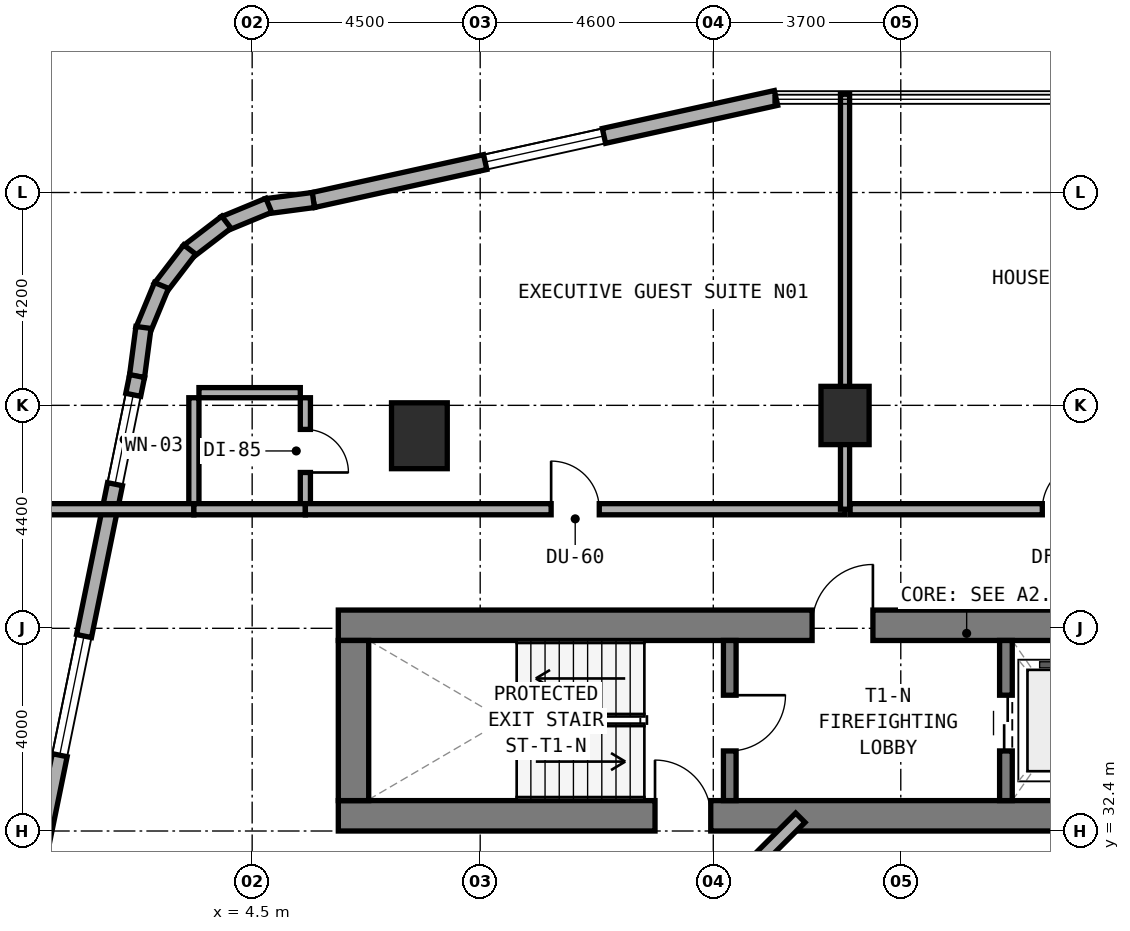
"""IFC4 building model, lengths in metres.
Left out: names, types, materials, properties, quantities, classifications, styles, units other than length and angle.
Written with IfcOpenShell. Run it as: python <this file> out.ifc"""

import sys

from ifc_helpers import new_model, si_unit, direction, frame, frame_2d, origin, origin_2d, place, context, subcontext, project, spatial, rectangle, extrude, element, fill, save


model = new_model("IFC4")
c1 = context("Model", 3, precision=1e-05, world=origin(), true_north=direction((0.0, 1.0)))
c2 = subcontext(c1, "Body", "Model", "MODEL_VIEW")
j1 = project(units=[si_unit("LENGTHUNIT", "METRE"), si_unit("PLANEANGLEUNIT", "RADIAN")], contexts=[c1])
p1 = place(None, origin())
s1 = spatial("IfcSite", under=j1, at=p1, CompositionType="ELEMENT")
p2 = place(p1, origin())
s2 = spatial("IfcBuilding", under=s1, at=p2, CompositionType="ELEMENT")
p3 = place(p2, frame((0.0, 0.0, 31.0)))
s3 = spatial("IfcBuildingStorey", under=s2, at=p3, CompositionType="ELEMENT", Elevation=31.0)
p4 = place(p3, frame((6.2, 32.7, 0.0), z_axis=(0.0, 0.0, 1.0), x_axis=(1.0, 0.0, 0.0)))
e1 = element("IfcWall", 1, at=p4, inside=s3, PredefinedType="SHEAR", context=c2, shape_type="SweptSolid", body=[
    extrude(rectangle(XDim=24.8, YDim=0.6, at=frame_2d((12.4, 0.0))), origin(), (0.0, 0.0, 1.0), 3.5),
])
p5 = place(p4, frame((6.25, 0.0, 0.0)))
e2 = element("IfcOpeningElement", 2, at=p5, cuts=e1, PredefinedType="OPENING", context=c2, shape_type="SweptSolid", body=[
    extrude(rectangle(XDim=1.1, YDim=2.15, at=frame_2d((0.55, 1.075))), frame((0.0, 0.31, 0.0), z_axis=(0.0, -1.0, 0.0), x_axis=(1.0, 0.0, 0.0)), (0.0, 0.0, 1.0), 0.62),
])
p6 = place(p3, frame((6.2, 36.46, 0.0), z_axis=(0.0, 0.0, 1.0), x_axis=(1.0, 0.0, 0.0)))
e3 = element("IfcWall", 3, at=p6, inside=s3, PredefinedType="SHEAR", context=c2, shape_type="SweptSolid", body=[
    extrude(rectangle(XDim=24.8, YDim=0.6, at=frame_2d((12.4, 0.0))), origin(), (0.0, 0.0, 1.0), 3.5),
])
p7 = place(p6, frame((9.35, 0.0, 0.0)))
e4 = element("IfcOpeningElement", 4, at=p7, cuts=e3, PredefinedType="OPENING", context=c2, shape_type="SweptSolid", body=[
    extrude(rectangle(XDim=1.2, YDim=2.15, at=frame_2d((0.6, 1.075))), frame((0.0, 0.31, 0.0), z_axis=(0.0, -1.0, 0.0), x_axis=(1.0, 0.0, 0.0)), (0.0, 0.0, 1.0), 0.62),
])
p8 = place(p6, frame((17.14, 0.0, 0.0)))
e5 = element("IfcOpeningElement", 5, at=p8, cuts=e3, PredefinedType="OPENING", context=c2, shape_type="SweptSolid", body=[
    extrude(rectangle(XDim=0.85, YDim=2.1, at=frame_2d((0.425, 1.05))), frame((0.0, 0.31, 0.0), z_axis=(0.0, -1.0, 0.0), x_axis=(1.0, 0.0, 0.0)), (0.0, 0.0, 1.0), 0.62),
])
p9 = place(p6, frame((18.983, 0.0, 0.0)))
e6 = element("IfcOpeningElement", 6, at=p9, cuts=e3, PredefinedType="OPENING", context=c2, shape_type="SweptSolid", body=[
    extrude(rectangle(XDim=1.1, YDim=2.15, at=frame_2d((0.55, 1.075))), frame((0.0, 0.31, 0.0), z_axis=(0.0, -1.0, 0.0), x_axis=(1.0, 0.0, 0.0)), (0.0, 0.0, 1.0), 0.62),
])
p10 = place(p6, frame((20.85, 0.0, 0.0)))
e7 = element("IfcOpeningElement", 7, at=p10, cuts=e3, PredefinedType="OPENING", context=c2, shape_type="SweptSolid", body=[
    extrude(rectangle(XDim=1.1, YDim=2.15, at=frame_2d((0.55, 1.075))), frame((0.0, 0.31, 0.0), z_axis=(0.0, -1.0, 0.0), x_axis=(1.0, 0.0, 0.0)), (0.0, 0.0, 1.0), 0.62),
])
p11 = place(p6, frame((22.716, 0.0, 0.0)))
e8 = element("IfcOpeningElement", 8, at=p11, cuts=e3, PredefinedType="OPENING", context=c2, shape_type="SweptSolid", body=[
    extrude(rectangle(XDim=1.1, YDim=2.15, at=frame_2d((0.55, 1.075))), frame((0.0, 0.31, 0.0), z_axis=(0.0, -1.0, 0.0), x_axis=(1.0, 0.0, 0.0)), (0.0, 0.0, 1.0), 0.62),
])
p12 = place(p3, frame((6.5, 33.0, 0.0), z_axis=(0.0, 0.0, 1.0), x_axis=(0.0, 1.0, 0.0)))
e9 = element("IfcWall", 9, at=p12, inside=s3, PredefinedType="SHEAR", context=c2, shape_type="SweptSolid", body=[
    extrude(rectangle(XDim=3.16, YDim=0.6, at=frame_2d((1.58, 0.0))), origin(), (0.0, 0.0, 1.0), 3.5),
])
p13 = place(p3, frame((13.925, 33.0, 0.0), z_axis=(0.0, 0.0, 1.0), x_axis=(0.0, 1.0, 0.0)))
e10 = element("IfcWall", 10, at=p13, inside=s3, PredefinedType="STANDARD", context=c2, shape_type="SweptSolid", body=[
    extrude(rectangle(XDim=3.16, YDim=0.25, at=frame_2d((1.58, 0.0))), origin(), (0.0, 0.0, 1.0), 3.22),
])
p14 = place(p13, frame((0.98, 0.0, 0.0)))
e11 = element("IfcOpeningElement", 11, at=p14, cuts=e10, PredefinedType="OPENING", context=c2, shape_type="SweptSolid", body=[
    extrude(rectangle(XDim=1.1, YDim=2.15, at=frame_2d((0.55, 1.075))), frame((0.0, 0.135, 0.0), z_axis=(0.0, -1.0, 0.0), x_axis=(1.0, 0.0, 0.0)), (0.0, 0.0, 1.0), 0.27),
])
p15 = place(p3, frame((19.375, 33.0, 0.0), z_axis=(0.0, 0.0, 1.0), x_axis=(0.0, 1.0, 0.0)))
e12 = element("IfcWall", 12, at=p15, inside=s3, PredefinedType="STANDARD", context=c2, shape_type="SweptSolid", body=[
    extrude(rectangle(XDim=3.16, YDim=0.25, at=frame_2d((1.58, 0.0))), origin(), (0.0, 0.0, 1.0), 3.22),
])
p16 = place(p15, frame((0.98, 0.0, 0.0)))
e13 = element("IfcOpeningElement", 13, at=p16, cuts=e12, PredefinedType="OPENING", context=c2, shape_type="SweptSolid", body=[
    extrude(rectangle(XDim=1.1, YDim=2.15, at=frame_2d((0.55, 1.075))), frame((0.0, 0.135, 0.0), z_axis=(0.0, -1.0, 0.0), x_axis=(1.0, 0.0, 0.0)), (0.0, 0.0, 1.0), 0.27),
])
p17 = place(p3, frame((16.2, 40.6, 0.0), z_axis=(0.0, 0.0, 1.0), x_axis=(1.0, 0.0, 0.0)))
e14 = element("IfcColumn", 14, at=p17, inside=s3, PredefinedType="COLUMN", context=c2, shape_type="SweptSolid", body=[
    extrude(rectangle(XDim=0.95, YDim=1.15, at=origin_2d()), origin(), (0.0, 0.0, 1.0), 3.5),
])
p18 = place(p3, frame((7.8, 40.2, 0.0), z_axis=(0.0, 0.0, 1.0), x_axis=(1.0, 0.0, 0.0)))
e15 = element("IfcColumn", 15, at=p18, inside=s3, PredefinedType="COLUMN", context=c2, shape_type="SweptSolid", body=[
    extrude(rectangle(XDim=1.1, YDim=1.3, at=origin_2d()), origin(), (0.0, 0.0, 1.0), 3.5),
])
p19 = place(p3, frame((14.838, 46.866, 0.0), z_axis=(0.0, 0.0, 1.0), x_axis=(-0.9765437942, -0.215318875183, 0.0)))
e16 = element("IfcWall", 16, at=p19, inside=s3, PredefinedType="STANDARD", context=c2, shape_type="SweptSolid", body=[
    extrude(rectangle(XDim=9.353, YDim=0.3, at=frame_2d((4.677, 0.0))), origin(), (0.0, 0.0, 1.0), 3.22),
])
p20 = place(p19, frame((3.477, 0.0, 0.8)))
e17 = element("IfcOpeningElement", 17, at=p20, cuts=e16, PredefinedType="OPENING", context=c2, shape_type="SweptSolid", body=[
    extrude(rectangle(XDim=2.4, YDim=1.6, at=frame_2d((1.2, 0.8))), frame((0.0, 0.16, 0.0), z_axis=(0.0, -1.0, 0.0), x_axis=(1.0, 0.0, 0.0)), (0.0, 0.0, 1.0), 0.32),
])
p21 = place(p3, frame((5.708, 44.852, 0.0), z_axis=(0.0, 0.0, 1.0), x_axis=(-0.991359246108, -0.131174864804, 0.0)))
e18 = element("IfcWall", 18, at=p21, inside=s3, PredefinedType="STANDARD", context=c2, shape_type="SweptSolid", body=[
    extrude(rectangle(XDim=0.938, YDim=0.3, at=frame_2d((0.469, 0.0))), origin(), (0.0, 0.0, 1.0), 3.22),
])
p22 = place(p3, frame((4.828, 44.748, 0.0), z_axis=(0.0, 0.0, 1.0), x_axis=(-0.923982547689, -0.382434636986, 0.0)))
e19 = element("IfcWall", 19, at=p22, inside=s3, PredefinedType="STANDARD", context=c2, shape_type="SweptSolid", body=[
    extrude(rectangle(XDim=0.954, YDim=0.3, at=frame_2d((0.477, 0.0))), origin(), (0.0, 0.0, 1.0), 3.22),
])
for number, where, z_axis, x_axis in (
    (20, (3.991, 44.414, 0.0), (0.0, 0.0, 1.0), (-0.794, -0.608, 0.0)),
    (21, (3.268, 43.875, 0.0), (0.0, 0.0, 1.0), (-0.608, -0.794, 0.0)),
):
    element("IfcWall", number, at=place(p3, frame(where, z_axis=z_axis, x_axis=x_axis)), inside=s3, PredefinedType="STANDARD", context=c2, shape_type="SweptSolid", body=[
        extrude(rectangle(XDim=0.955, YDim=0.3, at=frame_2d((0.478, 0.0))), origin(), (0.0, 0.0, 1.0), 3.22),
    ])
p23 = place(p3, frame((2.711, 43.166, 0.0), z_axis=(0.0, 0.0, 1.0), x_axis=(-0.382344263057, -0.924019948111, 0.0)))
e22 = element("IfcWall", 22, at=p23, inside=s3, PredefinedType="STANDARD", context=c2, shape_type="SweptSolid", body=[
    extrude(rectangle(XDim=0.955, YDim=0.3, at=frame_2d((0.477, 0.0))), origin(), (0.0, 0.0, 1.0), 3.22),
])
p24 = place(p3, frame((2.355, 42.337, 0.0), z_axis=(0.0, 0.0, 1.0), x_axis=(-0.130454512571, -0.991454295543, 0.0)))
e23 = element("IfcWall", 23, at=p24, inside=s3, PredefinedType="STANDARD", context=c2, shape_type="SweptSolid", body=[
    extrude(rectangle(XDim=0.973, YDim=0.3, at=frame_2d((0.487, 0.0))), origin(), (0.0, 0.0, 1.0), 3.22),
])
p25 = place(p3, frame((2.229, 41.378, 0.0), z_axis=(0.0, 0.0, 1.0), x_axis=(-0.199990901713, -0.979797754249, 0.0)))
e24 = element("IfcWall", 24, at=p25, inside=s3, PredefinedType="STANDARD", context=c2, shape_type="SweptSolid", body=[
    extrude(rectangle(XDim=10.065, YDim=0.3, at=frame_2d((5.033, 0.0))), origin(), (0.0, 0.0, 1.0), 3.22),
])
p26 = place(p25, frame((0.378, 0.0, 0.85)))
e25 = element("IfcOpeningElement", 25, at=p26, cuts=e24, PredefinedType="OPENING", context=c2, shape_type="SweptSolid", body=[
    extrude(rectangle(XDim=1.8, YDim=1.5, at=frame_2d((0.9, 0.75))), frame((0.0, 0.16, 0.0), z_axis=(0.0, -1.0, 0.0), x_axis=(1.0, 0.0, 0.0)), (0.0, 0.0, 1.0), 0.32),
])
p27 = place(p25, frame((5.236, 0.0, 0.8)))
e26 = element("IfcOpeningElement", 26, at=p27, cuts=e24, PredefinedType="OPENING", context=c2, shape_type="SweptSolid", body=[
    extrude(rectangle(XDim=2.4, YDim=1.6, at=frame_2d((1.2, 0.8))), frame((0.0, 0.16, 0.0), z_axis=(0.0, -1.0, 0.0), x_axis=(1.0, 0.0, 0.0)), (0.0, 0.0, 1.0), 0.32),
])
p28 = place(p3, frame((15.318, 32.662, 0.0), z_axis=(0.0, 0.0, 1.0), x_axis=(-0.707106781187, -0.707106781187, 0.0)))
e27 = element("IfcWall", 27, at=p28, inside=s3, PredefinedType="STANDARD", context=c2, shape_type="SweptSolid", body=[
    extrude(rectangle(XDim=2.594, YDim=0.26, at=frame_2d((1.297, 0.0))), origin(), (0.0, 0.0, 1.0), 3.22),
])
p29 = place(p3, frame((5.55, 38.85, 0.0), z_axis=(0.0, 0.0, 1.0), x_axis=(0.0, 1.0, 0.0)))
e28 = element("IfcWall", 28, at=p29, inside=s3, PredefinedType="PLUMBINGWALL", context=c2, shape_type="SweptSolid", body=[
    extrude(rectangle(XDim=2.1, YDim=0.2, at=frame_2d((1.05, 0.0))), origin(), (0.0, 0.0, 1.0), 3.22),
])
p30 = place(p29, frame((0.625, 0.0, 0.0)))
e29 = element("IfcOpeningElement", 29, at=p30, cuts=e28, PredefinedType="OPENING", context=c2, shape_type="SweptSolid", body=[
    extrude(rectangle(XDim=0.85, YDim=2.1, at=frame_2d((0.425, 1.05))), frame((0.0, 0.11, 0.0), z_axis=(0.0, -1.0, 0.0), x_axis=(1.0, 0.0, 0.0)), (0.0, 0.0, 1.0), 0.22),
])
p31 = place(p3, frame((3.45, 41.05, 0.0), z_axis=(0.0, 0.0, 1.0), x_axis=(1.0, 0.0, 0.0)))
e30 = element("IfcWall", 30, at=p31, inside=s3, PredefinedType="PLUMBINGWALL", context=c2, shape_type="SweptSolid", body=[
    extrude(rectangle(XDim=2.0, YDim=0.2, at=frame_2d((1.0, 0.0))), origin(), (0.0, 0.0, 1.0), 3.22),
])
p32 = place(p3, frame((3.35, 38.85, 0.0), z_axis=(0.0, 0.0, 1.0), x_axis=(0.0, 1.0, 0.0)))
e31 = element("IfcWall", 31, at=p32, inside=s3, PredefinedType="PLUMBINGWALL", context=c2, shape_type="SweptSolid", body=[
    extrude(rectangle(XDim=2.1, YDim=0.2, at=frame_2d((1.05, 0.0))), origin(), (0.0, 0.0, 1.0), 3.22),
])
p33 = place(p3, frame((0.24, 38.75, 0.0), z_axis=(0.0, 0.0, 1.0), x_axis=(1.0, 0.0, 0.0)))
e32 = element("IfcWall", 32, at=p33, inside=s3, PredefinedType="SOLIDWALL", context=c2, shape_type="SweptSolid", body=[
    extrude(rectangle(XDim=3.11, YDim=0.22, at=frame_2d((1.555, 0.0))), origin(), (0.0, 0.0, 1.0), 3.22),
])
p34 = place(p3, frame((3.35, 38.75, 0.0), z_axis=(0.0, 0.0, 1.0), x_axis=(1.0, 0.0, 0.0)))
e33 = element("IfcWall", 33, at=p34, inside=s3, PredefinedType="SOLIDWALL", context=c2, shape_type="SweptSolid", body=[
    extrude(rectangle(XDim=2.2, YDim=0.22, at=frame_2d((1.1, 0.0))), origin(), (0.0, 0.0, 1.0), 3.22),
])
p35 = place(p3, frame((5.55, 38.75, 0.0), z_axis=(0.0, 0.0, 1.0), x_axis=(1.0, 0.0, 0.0)))
e34 = element("IfcWall", 34, at=p35, inside=s3, PredefinedType="SOLIDWALL", context=c2, shape_type="SweptSolid", body=[
    extrude(rectangle(XDim=10.65, YDim=0.22, at=frame_2d((5.325, 0.0))), origin(), (0.0, 0.0, 1.0), 2.395),
])
p36 = place(p35, frame((4.85, 0.0, 0.0)))
e35 = element("IfcOpeningElement", 35, at=p36, cuts=e34, PredefinedType="OPENING", context=c2, shape_type="SweptSolid", body=[
    extrude(rectangle(XDim=0.95, YDim=2.1, at=frame_2d((0.475, 1.05))), frame((0.0, 0.12, 0.0), z_axis=(0.0, -1.0, 0.0), x_axis=(1.0, 0.0, 0.0)), (0.0, 0.0, 1.0), 0.24),
])
p37 = place(p3, frame((16.2, 38.75, 0.0), z_axis=(0.0, 0.0, 1.0), x_axis=(0.0, 1.0, 0.0)))
e36 = element("IfcWall", 36, at=p37, inside=s3, PredefinedType="SOLIDWALL", context=c2, shape_type="SweptSolid", body=[
    extrude(rectangle(XDim=8.19, YDim=0.18, at=frame_2d((4.095, 0.0))), origin(), (0.0, 0.0, 1.0), 2.395),
])
p38 = place(p3, frame((16.3, 38.75, 0.0), z_axis=(0.0, 0.0, 1.0), x_axis=(1.0, 0.0, 0.0)))
e37 = element("IfcWall", 37, at=p38, inside=s3, PredefinedType="SOLIDWALL", context=c2, shape_type="SweptSolid", body=[
    extrude(rectangle(XDim=9.4, YDim=0.22, at=frame_2d((4.7, 0.0))), origin(), (0.0, 0.0, 1.0), 2.795),
])
p39 = place(p38, frame((3.793, 0.0, 0.0)))
e38 = element("IfcOpeningElement", 38, at=p39, cuts=e37, PredefinedType="OPENING", context=c2, shape_type="SweptSolid", body=[
    extrude(rectangle(XDim=0.95, YDim=2.1, at=frame_2d((0.475, 1.05))), frame((0.0, 0.12, 0.0), z_axis=(0.0, -1.0, 0.0), x_axis=(1.0, 0.0, 0.0)), (0.0, 0.0, 1.0), 0.24),
])
p40 = place(p20, origin())
e39 = element("IfcWindow", 39, at=p40, inside=s3, PartitioningType="SINGLE_PANEL", PredefinedType="WINDOW", context=c2, shape_type="SweptSolid", body=[
    extrude(rectangle(XDim=2.4, YDim=1.6, at=frame_2d((1.2, 0.8))), frame((0.0, 0.03, 0.0), z_axis=(0.0, -1.0, 0.0), x_axis=(1.0, 0.0, 0.0)), (0.0, 0.0, 1.0), 0.06),
])
fill(e17, e39)
p41 = place(p26, origin())
e40 = element("IfcWindow", 40, at=p41, inside=s3, PartitioningType="SINGLE_PANEL", PredefinedType="WINDOW", context=c2, shape_type="SweptSolid", body=[
    extrude(rectangle(XDim=1.8, YDim=1.5, at=frame_2d((0.9, 0.75))), frame((0.0, 0.03, 0.0), z_axis=(0.0, -1.0, 0.0), x_axis=(1.0, 0.0, 0.0)), (0.0, 0.0, 1.0), 0.06),
])
fill(e25, e40)
p42 = place(p27, origin())
e41 = element("IfcWindow", 41, at=p42, inside=s3, PartitioningType="SINGLE_PANEL", PredefinedType="WINDOW", context=c2, shape_type="SweptSolid", body=[
    extrude(rectangle(XDim=2.4, YDim=1.6, at=frame_2d((1.2, 0.8))), frame((0.0, 0.03, 0.0), z_axis=(0.0, -1.0, 0.0), x_axis=(1.0, 0.0, 0.0)), (0.0, 0.0, 1.0), 0.06),
])
fill(e26, e41)
p43 = place(p14, frame((1.1, 0.0, 0.0), z_axis=(0.0, 0.0, 1.0), x_axis=(-1.0, 0.0, 0.0)))
e42 = element("IfcDoor", 42, at=p43, inside=s3, OperationType="SINGLE_SWING_LEFT", PredefinedType="DOOR", context=c2, shape_type="SweptSolid", body=[
    extrude(rectangle(XDim=1.1, YDim=2.15, at=frame_2d((0.55, 1.075))), frame((0.0, 0.025, 0.0), z_axis=(0.0, -1.0, 0.0), x_axis=(1.0, 0.0, 0.0)), (0.0, 0.0, 1.0), 0.05),
])
fill(e11, e42)
p44 = place(p7, origin())
e43 = element("IfcDoor", 43, at=p44, inside=s3, OperationType="SINGLE_SWING_RIGHT", PredefinedType="DOOR", context=c2, shape_type="SweptSolid", body=[
    extrude(rectangle(XDim=1.2, YDim=2.15, at=frame_2d((0.6, 1.075))), frame((0.0, 0.025, 0.0), z_axis=(0.0, -1.0, 0.0), x_axis=(1.0, 0.0, 0.0)), (0.0, 0.0, 1.0), 0.05),
])
fill(e4, e43)
p45 = place(p16, origin())
e44 = element("IfcDoor", 44, at=p45, inside=s3, OperationType="DOUBLE_DOOR_SLIDING", PredefinedType="DOOR", context=c2, shape_type="SweptSolid", body=[
    extrude(rectangle(XDim=1.1, YDim=2.15, at=frame_2d((0.55, 1.075))), frame((0.0, 0.025, 0.0), z_axis=(0.0, -1.0, 0.0), x_axis=(1.0, 0.0, 0.0)), (0.0, 0.0, 1.0), 0.05),
])
fill(e13, e44)
p46 = place(p5, origin())
e45 = element("IfcDoor", 45, at=p46, inside=s3, OperationType="SINGLE_SWING_LEFT", PredefinedType="DOOR", context=c2, shape_type="SweptSolid", body=[
    extrude(rectangle(XDim=1.1, YDim=2.15, at=frame_2d((0.55, 1.075))), frame((0.0, 0.025, 0.0), z_axis=(0.0, -1.0, 0.0), x_axis=(1.0, 0.0, 0.0)), (0.0, 0.0, 1.0), 0.05),
])
fill(e2, e45)
p47 = place(p30, frame((0.85, 0.0, 0.0), z_axis=(0.0, 0.0, 1.0), x_axis=(-1.0, 0.0, 0.0)))
e46 = element("IfcDoor", 46, at=p47, inside=s3, OperationType="SINGLE_SWING_RIGHT", PredefinedType="DOOR", context=c2, shape_type="SweptSolid", body=[
    extrude(rectangle(XDim=0.85, YDim=2.1, at=frame_2d((0.425, 1.05))), frame((0.0, 0.025, 0.0), z_axis=(0.0, -1.0, 0.0), x_axis=(1.0, 0.0, 0.0)), (0.0, 0.0, 1.0), 0.05),
])
fill(e29, e46)
p48 = place(p36, origin())
e47 = element("IfcDoor", 47, at=p48, inside=s3, OperationType="SINGLE_SWING_LEFT", PredefinedType="DOOR", context=c2, shape_type="SweptSolid", body=[
    extrude(rectangle(XDim=0.95, YDim=2.1, at=frame_2d((0.475, 1.05))), frame((0.0, 0.025, 0.0), z_axis=(0.0, -1.0, 0.0), x_axis=(1.0, 0.0, 0.0)), (0.0, 0.0, 1.0), 0.05),
])
fill(e35, e47)
p49 = place(p39, origin())
e48 = element("IfcDoor", 48, at=p49, inside=s3, OperationType="SINGLE_SWING_RIGHT", PredefinedType="DOOR", context=c2, shape_type="SweptSolid", body=[
    extrude(rectangle(XDim=0.95, YDim=2.1, at=frame_2d((0.475, 1.05))), frame((0.0, 0.025, 0.0), z_axis=(0.0, -1.0, 0.0), x_axis=(1.0, 0.0, 0.0)), (0.0, 0.0, 1.0), 0.05),
])
fill(e38, e48)
save(model, sys.argv[1])
